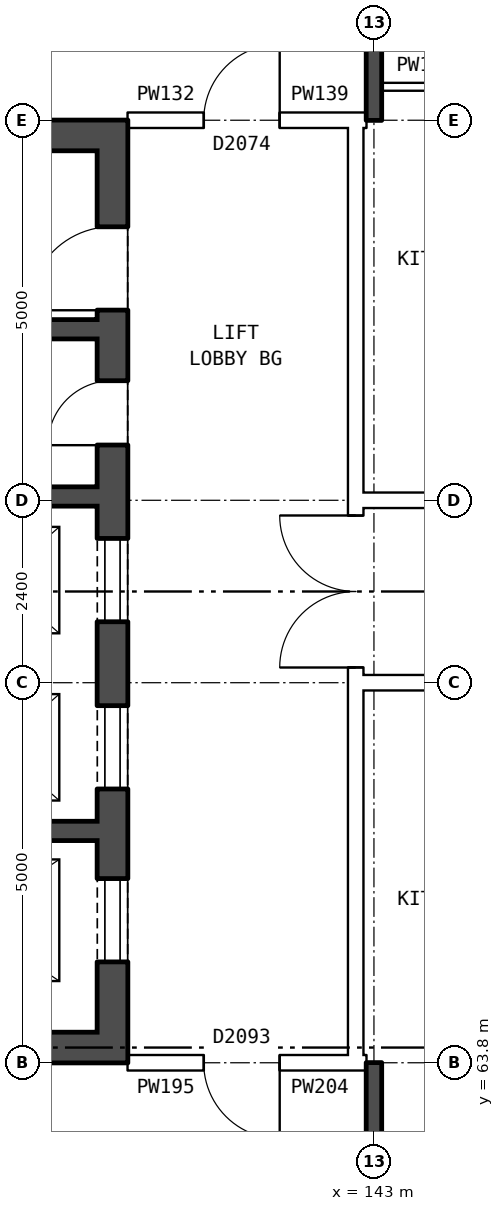
"""IFC4 building model, lengths in metres.
Left out: names, types, materials, properties, quantities, classifications, styles, units other than length and angle.
Written with IfcOpenShell. Run it as: python <this file> out.ifc"""

import sys

from ifc_helpers import new_model, si_unit, direction, frame, frame_2d, origin, place, context, subcontext, project, spatial, rectangle, extrude, element, fill, save


model = new_model("IFC4")
c1 = context("Model", 3, precision=1e-05, world=origin(), true_north=direction((0.0, 1.0)))
c2 = subcontext(c1, "Body", "Model", "MODEL_VIEW")
j1 = project(units=[si_unit("LENGTHUNIT", "METRE"), si_unit("PLANEANGLEUNIT", "RADIAN")], contexts=[c1])
p1 = place(None, origin())
s1 = spatial("IfcSite", under=j1, at=p1, CompositionType="ELEMENT")
p2 = place(p1, origin())
s2 = spatial("IfcBuilding", under=s1, at=p2, CompositionType="ELEMENT")
p3 = place(p2, frame((0.0, 0.0, 205.9)))
s3 = spatial("IfcBuildingStorey", under=s2, at=p3, CompositionType="ELEMENT", Elevation=205.9)
p4 = place(p3, frame((139.56, 63.8, 0.0), z_axis=(0.0, 0.0, 1.0), x_axis=(0.0, 1.0, 0.0)))
e1 = element("IfcWall", 1, at=p4, inside=s3, PredefinedType="SHEAR", context=c2, shape_type="SweptSolid", body=[
    extrude(rectangle(XDim=12.4, YDim=0.4, at=frame_2d((6.2, 0.0))), origin(), (0.0, 0.0, 1.0), 2.85),
])
p5 = place(p4, frame((1.325, 0.0, 0.0)))
e2 = element("IfcOpeningElement", 2, at=p5, cuts=e1, PredefinedType="OPENING", context=c2, shape_type="SweptSolid", body=[
    extrude(rectangle(XDim=1.1, YDim=2.1, at=frame_2d((0.55, 1.05))), frame((0.0, 0.21, 0.0), z_axis=(0.0, -1.0, 0.0), x_axis=(1.0, 0.0, 0.0)), (0.0, 0.0, 1.0), 0.42),
])
p6 = place(p4, frame((3.6, 0.0, 0.0)))
e3 = element("IfcOpeningElement", 3, at=p6, cuts=e1, PredefinedType="OPENING", context=c2, shape_type="SweptSolid", body=[
    extrude(rectangle(XDim=1.1, YDim=2.1, at=frame_2d((0.55, 1.05))), frame((0.0, 0.21, 0.0), z_axis=(0.0, -1.0, 0.0), x_axis=(1.0, 0.0, 0.0)), (0.0, 0.0, 1.0), 0.42),
])
p7 = place(p4, frame((5.8, 0.0, 0.0)))
e4 = element("IfcOpeningElement", 4, at=p7, cuts=e1, PredefinedType="OPENING", context=c2, shape_type="SweptSolid", body=[
    extrude(rectangle(XDim=1.1, YDim=2.1, at=frame_2d((0.55, 1.05))), frame((0.0, 0.21, 0.0), z_axis=(0.0, -1.0, 0.0), x_axis=(1.0, 0.0, 0.0)), (0.0, 0.0, 1.0), 0.42),
])
p8 = place(p4, frame((9.9, 0.0, 0.0)))
e5 = element("IfcOpeningElement", 5, at=p8, cuts=e1, PredefinedType="OPENING", context=c2, shape_type="SweptSolid", body=[
    extrude(rectangle(XDim=1.1, YDim=2.1, at=frame_2d((0.55, 1.05))), frame((0.0, 0.21, 0.0), z_axis=(0.0, -1.0, 0.0), x_axis=(1.0, 0.0, 0.0)), (0.0, 0.0, 1.0), 0.42),
])
p9 = place(p4, frame((8.125, 0.0, 0.0)))
e6 = element("IfcOpeningElement", 6, at=p9, cuts=e1, PredefinedType="OPENING", context=c2, shape_type="SweptSolid", body=[
    extrude(rectangle(XDim=0.85, YDim=2.1, at=frame_2d((0.425, 1.05))), frame((0.0, 0.21, 0.0), z_axis=(0.0, -1.0, 0.0), x_axis=(1.0, 0.0, 0.0)), (0.0, 0.0, 1.0), 0.42),
])
for number, where, z_axis, x_axis in (
    (7, (139.36, 64.0, 0.0), (0.0, 0.0, 1.0), (-1.0, 0.0, 0.0)),
    (8, (139.36, 76.0, 0.0), (0.0, 0.0, 1.0), (-1.0, 0.0, 0.0)),
):
    element("IfcWall", number, at=place(p3, frame(where, z_axis=z_axis, x_axis=x_axis)), inside=s3, PredefinedType="SHEAR", context=c2, shape_type="SweptSolid", body=[
        extrude(rectangle(XDim=7.6, YDim=0.4, at=frame_2d((3.8, 0.0))), origin(), (0.0, 0.0, 1.0), 2.85),
    ])
p10 = place(p3, frame((139.36, 66.85, 0.0), z_axis=(0.0, 0.0, 1.0), x_axis=(-1.0, 0.0, 0.0)))
e9 = element("IfcWall", 9, at=p10, inside=s3, PredefinedType="SHEAR", context=c2, shape_type="SweptSolid", body=[
    extrude(rectangle(XDim=4.775, YDim=0.25, at=frame_2d((2.388, 0.0))), origin(), (0.0, 0.0, 1.0), 2.85),
])
p11 = place(p3, frame((139.36, 71.25, 0.0), z_axis=(0.0, 0.0, 1.0), x_axis=(-1.0, 0.0, 0.0)))
e10 = element("IfcWall", 10, at=p11, inside=s3, PredefinedType="SHEAR", context=c2, shape_type="SweptSolid", body=[
    extrude(rectangle(XDim=7.6, YDim=0.25, at=frame_2d((3.8, 0.0))), origin(), (0.0, 0.0, 1.0), 2.85),
])
p12 = place(p11, frame((5.175, 0.0, 0.0)))
e11 = element("IfcOpeningElement", 11, at=p12, cuts=e10, PredefinedType="OPENING", context=c2, shape_type="SweptSolid", body=[
    extrude(rectangle(XDim=1.1, YDim=2.1, at=frame_2d((0.55, 1.05))), frame((0.0, 0.135, 0.0), z_axis=(0.0, -1.0, 0.0), x_axis=(1.0, 0.0, 0.0)), (0.0, 0.0, 1.0), 0.27),
])
p13 = place(p11, frame((3.35, 0.0, 0.0)))
e12 = element("IfcOpeningElement", 12, at=p13, cuts=e10, PredefinedType="OPENING", context=c2, shape_type="SweptSolid", body=[
    extrude(rectangle(XDim=0.85, YDim=2.1, at=frame_2d((0.425, 1.05))), frame((0.0, 0.135, 0.0), z_axis=(0.0, -1.0, 0.0), x_axis=(1.0, 0.0, 0.0)), (0.0, 0.0, 1.0), 0.27),
])
p14 = place(p3, frame((139.36, 73.45, 0.0), z_axis=(0.0, 0.0, 1.0), x_axis=(-1.0, 0.0, 0.0)))
e13 = element("IfcWall", 13, at=p14, inside=s3, PredefinedType="SHEAR", context=c2, shape_type="SweptSolid", body=[
    extrude(rectangle(XDim=2.525, YDim=0.25, at=frame_2d((1.263, 0.0))), origin(), (0.0, 0.0, 1.0), 2.85),
])
p15 = place(p3, frame((142.76, 63.9, 0.0), z_axis=(0.0, 0.0, 1.0), x_axis=(0.0, 1.0, 0.0)))
e14 = element("IfcWall", 14, at=p15, inside=s3, PredefinedType="PARTITIONING", context=c2, shape_type="SweptSolid", body=[
    extrude(rectangle(XDim=12.2, YDim=0.2, at=frame_2d((6.1, 0.0))), origin(), (0.0, 0.0, 1.0), 2.85),
])
p16 = place(p15, frame((5.1, 0.0, 0.0)))
e15 = element("IfcOpeningElement", 15, at=p16, cuts=e14, PredefinedType="OPENING", context=c2, shape_type="SweptSolid", body=[
    extrude(rectangle(XDim=2.0, YDim=2.1, at=frame_2d((1.0, 1.05))), frame((0.0, 0.11, 0.0), z_axis=(0.0, -1.0, 0.0), x_axis=(1.0, 0.0, 0.0)), (0.0, 0.0, 1.0), 0.22),
])
p17 = place(p3, frame((139.76, 63.8, 0.0), z_axis=(0.0, 0.0, 1.0), x_axis=(1.0, 0.0, 0.0)))
e16 = element("IfcWall", 16, at=p17, inside=s3, PredefinedType="PARTITIONING", context=c2, shape_type="SweptSolid", body=[
    extrude(rectangle(XDim=3.0, YDim=0.2, at=frame_2d((1.5, 0.0))), origin(), (0.0, 0.0, 1.0), 2.85),
])
p18 = place(p17, frame((1.0, 0.0, 0.0)))
e17 = element("IfcOpeningElement", 17, at=p18, cuts=e16, PredefinedType="OPENING", context=c2, shape_type="SweptSolid", body=[
    extrude(rectangle(XDim=1.0, YDim=2.1, at=frame_2d((0.5, 1.05))), frame((0.0, 0.11, 0.0), z_axis=(0.0, -1.0, 0.0), x_axis=(1.0, 0.0, 0.0)), (0.0, 0.0, 1.0), 0.22),
])
p19 = place(p3, frame((142.76, 63.8, 0.0), z_axis=(0.0, 0.0, 1.0), x_axis=(1.0, 0.0, 0.0)))
e18 = element("IfcWall", 18, at=p19, inside=s3, PredefinedType="PARTITIONING", context=c2, shape_type="SweptSolid", body=[
    extrude(rectangle(XDim=0.14, YDim=0.2, at=frame_2d((0.07, 0.0))), origin(), (0.0, 0.0, 1.0), 2.85),
])
p20 = place(p3, frame((142.76, 68.8, 0.0), z_axis=(0.0, 0.0, 1.0), x_axis=(1.0, 0.0, 0.0)))
e19 = element("IfcWall", 19, at=p20, inside=s3, PredefinedType="PARTITIONING", context=c2, shape_type="SweptSolid", body=[
    extrude(rectangle(XDim=14.48, YDim=0.2, at=frame_2d((7.24, 0.0))), origin(), (0.0, 0.0, 1.0), 2.85),
])
p21 = place(p20, frame((1.12, 0.0, 0.0)))
e20 = element("IfcOpeningElement", 20, at=p21, cuts=e19, PredefinedType="OPENING", context=c2, shape_type="SweptSolid", body=[
    extrude(rectangle(XDim=1.0, YDim=2.1, at=frame_2d((0.5, 1.05))), frame((0.0, 0.11, 0.0), z_axis=(0.0, -1.0, 0.0), x_axis=(1.0, 0.0, 0.0)), (0.0, 0.0, 1.0), 0.22),
])
p22 = place(p20, frame((10.24, 0.0, 0.0)))
e21 = element("IfcOpeningElement", 21, at=p22, cuts=e19, PredefinedType="OPENING", context=c2, shape_type="SweptSolid", body=[
    extrude(rectangle(XDim=1.0, YDim=2.1, at=frame_2d((0.5, 1.05))), frame((0.0, 0.11, 0.0), z_axis=(0.0, -1.0, 0.0), x_axis=(1.0, 0.0, 0.0)), (0.0, 0.0, 1.0), 0.22),
])
p23 = place(p3, frame((142.76, 71.2, 0.0), z_axis=(0.0, 0.0, 1.0), x_axis=(1.0, 0.0, 0.0)))
e22 = element("IfcWall", 22, at=p23, inside=s3, PredefinedType="PARTITIONING", context=c2, shape_type="SweptSolid", body=[
    extrude(rectangle(XDim=14.48, YDim=0.2, at=frame_2d((7.24, 0.0))), origin(), (0.0, 0.0, 1.0), 2.85),
])
p24 = place(p23, frame((1.12, 0.0, 0.0)))
e23 = element("IfcOpeningElement", 23, at=p24, cuts=e22, PredefinedType="OPENING", context=c2, shape_type="SweptSolid", body=[
    extrude(rectangle(XDim=1.0, YDim=2.1, at=frame_2d((0.5, 1.05))), frame((0.0, 0.11, 0.0), z_axis=(0.0, -1.0, 0.0), x_axis=(1.0, 0.0, 0.0)), (0.0, 0.0, 1.0), 0.22),
])
p25 = place(p23, frame((7.24, 0.0, 0.0)))
e24 = element("IfcOpeningElement", 24, at=p25, cuts=e22, PredefinedType="OPENING", context=c2, shape_type="SweptSolid", body=[
    extrude(rectangle(XDim=1.0, YDim=2.1, at=frame_2d((0.5, 1.05))), frame((0.0, 0.11, 0.0), z_axis=(0.0, -1.0, 0.0), x_axis=(1.0, 0.0, 0.0)), (0.0, 0.0, 1.0), 0.22),
])
p26 = place(p3, frame((139.76, 76.2, 0.0), z_axis=(0.0, 0.0, 1.0), x_axis=(1.0, 0.0, 0.0)))
e25 = element("IfcWall", 25, at=p26, inside=s3, PredefinedType="PARTITIONING", context=c2, shape_type="SweptSolid", body=[
    extrude(rectangle(XDim=3.0, YDim=0.2, at=frame_2d((1.5, 0.0))), origin(), (0.0, 0.0, 1.0), 2.85),
])
p27 = place(p26, frame((1.0, 0.0, 0.0)))
e26 = element("IfcOpeningElement", 26, at=p27, cuts=e25, PredefinedType="OPENING", context=c2, shape_type="SweptSolid", body=[
    extrude(rectangle(XDim=1.0, YDim=2.1, at=frame_2d((0.5, 1.05))), frame((0.0, 0.11, 0.0), z_axis=(0.0, -1.0, 0.0), x_axis=(1.0, 0.0, 0.0)), (0.0, 0.0, 1.0), 0.22),
])
p28 = place(p3, frame((142.76, 76.2, 0.0), z_axis=(0.0, 0.0, 1.0), x_axis=(1.0, 0.0, 0.0)))
e27 = element("IfcWall", 27, at=p28, inside=s3, PredefinedType="PARTITIONING", context=c2, shape_type="SweptSolid", body=[
    extrude(rectangle(XDim=0.14, YDim=0.2, at=frame_2d((0.07, 0.0))), origin(), (0.0, 0.0, 1.0), 2.85),
])
p29 = place(p3, frame((143.1, 76.64, 0.0), z_axis=(0.0, 0.0, 1.0), x_axis=(1.0, 0.0, 0.0)))
e28 = element("IfcWall", 28, at=p29, inside=s3, PredefinedType="PARTITIONING", context=c2, shape_type="SweptSolid", body=[
    extrude(rectangle(XDim=2.9, YDim=0.1, at=frame_2d((1.45, 0.0))), origin(), (0.0, 0.0, 1.0), 2.85),
])
p30 = place(p29, frame((1.0, 0.0, 0.0)))
e29 = element("IfcOpeningElement", 29, at=p30, cuts=e28, PredefinedType="OPENING", context=c2, shape_type="SweptSolid", body=[
    extrude(rectangle(XDim=0.9, YDim=2.1, at=frame_2d((0.45, 1.05))), frame((0.0, 0.06, 0.0), z_axis=(0.0, -1.0, 0.0), x_axis=(1.0, 0.0, 0.0)), (0.0, 0.0, 1.0), 0.12),
])
for number, where, z_axis, x_axis in (
    (30, (143.0, 54.36, 0.0), (0.0, 0.0, 1.0), (0.0, 1.0, 0.0)),
    (31, (143.0, 76.2, 0.0), (0.0, 0.0, 1.0), (0.0, 1.0, 0.0)),
):
    element("IfcWall", number, at=place(p3, frame(where, z_axis=z_axis, x_axis=x_axis)), inside=s3, PredefinedType="SOLIDWALL", context=c2, shape_type="SweptSolid", body=[
        extrude(rectangle(XDim=9.44, YDim=0.2, at=frame_2d((4.72, 0.0))), origin(), (0.0, 0.0, 1.0), 2.85),
    ])
p31 = place(p5, origin())
e32 = element("IfcDoor", 32, at=p31, inside=s3, OperationType="DOUBLE_DOOR_SLIDING", PredefinedType="DOOR", context=c2, shape_type="SweptSolid", body=[
    extrude(rectangle(XDim=1.1, YDim=2.1, at=frame_2d((0.55, 1.05))), frame((0.0, 0.185, 0.0), z_axis=(0.0, -1.0, 0.0), x_axis=(1.0, 0.0, 0.0)), (0.0, 0.0, 1.0), 0.05),
])
fill(e2, e32)
p32 = place(p6, origin())
e33 = element("IfcDoor", 33, at=p32, inside=s3, OperationType="DOUBLE_DOOR_SLIDING", PredefinedType="DOOR", context=c2, shape_type="SweptSolid", body=[
    extrude(rectangle(XDim=1.1, YDim=2.1, at=frame_2d((0.55, 1.05))), frame((0.0, 0.185, 0.0), z_axis=(0.0, -1.0, 0.0), x_axis=(1.0, 0.0, 0.0)), (0.0, 0.0, 1.0), 0.05),
])
fill(e3, e33)
p33 = place(p7, origin())
e34 = element("IfcDoor", 34, at=p33, inside=s3, OperationType="DOUBLE_DOOR_SLIDING", PredefinedType="DOOR", context=c2, shape_type="SweptSolid", body=[
    extrude(rectangle(XDim=1.1, YDim=2.1, at=frame_2d((0.55, 1.05))), frame((0.0, 0.185, 0.0), z_axis=(0.0, -1.0, 0.0), x_axis=(1.0, 0.0, 0.0)), (0.0, 0.0, 1.0), 0.05),
])
fill(e4, e34)
p34 = place(p8, origin())
e35 = element("IfcDoor", 35, at=p34, inside=s3, OperationType="SINGLE_SWING_LEFT", PredefinedType="DOOR", context=c2, shape_type="SweptSolid", body=[
    extrude(rectangle(XDim=1.1, YDim=2.1, at=frame_2d((0.55, 1.05))), frame((0.0, 0.185, 0.0), z_axis=(0.0, -1.0, 0.0), x_axis=(1.0, 0.0, 0.0)), (0.0, 0.0, 1.0), 0.05),
])
fill(e5, e35)
p35 = place(p9, origin())
e36 = element("IfcDoor", 36, at=p35, inside=s3, OperationType="SINGLE_SWING_LEFT", PredefinedType="DOOR", context=c2, shape_type="SweptSolid", body=[
    extrude(rectangle(XDim=0.85, YDim=2.1, at=frame_2d((0.425, 1.05))), frame((0.0, 0.185, 0.0), z_axis=(0.0, -1.0, 0.0), x_axis=(1.0, 0.0, 0.0)), (0.0, 0.0, 1.0), 0.05),
])
fill(e6, e36)
p36 = place(p16, origin())
e37 = element("IfcDoor", 37, at=p36, inside=s3, OperationType="DOUBLE_DOOR_SINGLE_SWING", PredefinedType="DOOR", context=c2, shape_type="SweptSolid", body=[
    extrude(rectangle(XDim=2.0, YDim=2.1, at=frame_2d((1.0, 1.05))), frame((0.0, 0.025, 0.0), z_axis=(0.0, -1.0, 0.0), x_axis=(1.0, 0.0, 0.0)), (0.0, 0.0, 1.0), 0.05),
])
fill(e15, e37)
p37 = place(p18, frame((1.0, 0.0, 0.0), z_axis=(0.0, 0.0, 1.0), x_axis=(-1.0, 0.0, 0.0)))
e38 = element("IfcDoor", 38, at=p37, inside=s3, OperationType="SINGLE_SWING_LEFT", PredefinedType="DOOR", context=c2, shape_type="SweptSolid", body=[
    extrude(rectangle(XDim=1.0, YDim=2.1, at=frame_2d((0.5, 1.05))), frame((0.0, 0.025, 0.0), z_axis=(0.0, -1.0, 0.0), x_axis=(1.0, 0.0, 0.0)), (0.0, 0.0, 1.0), 0.05),
])
fill(e17, e38)
p38 = place(p27, origin())
e39 = element("IfcDoor", 39, at=p38, inside=s3, OperationType="SINGLE_SWING_RIGHT", PredefinedType="DOOR", context=c2, shape_type="SweptSolid", body=[
    extrude(rectangle(XDim=1.0, YDim=2.1, at=frame_2d((0.5, 1.05))), frame((0.0, 0.025, 0.0), z_axis=(0.0, -1.0, 0.0), x_axis=(1.0, 0.0, 0.0)), (0.0, 0.0, 1.0), 0.05),
])
fill(e26, e39)
save(model, sys.argv[1])
